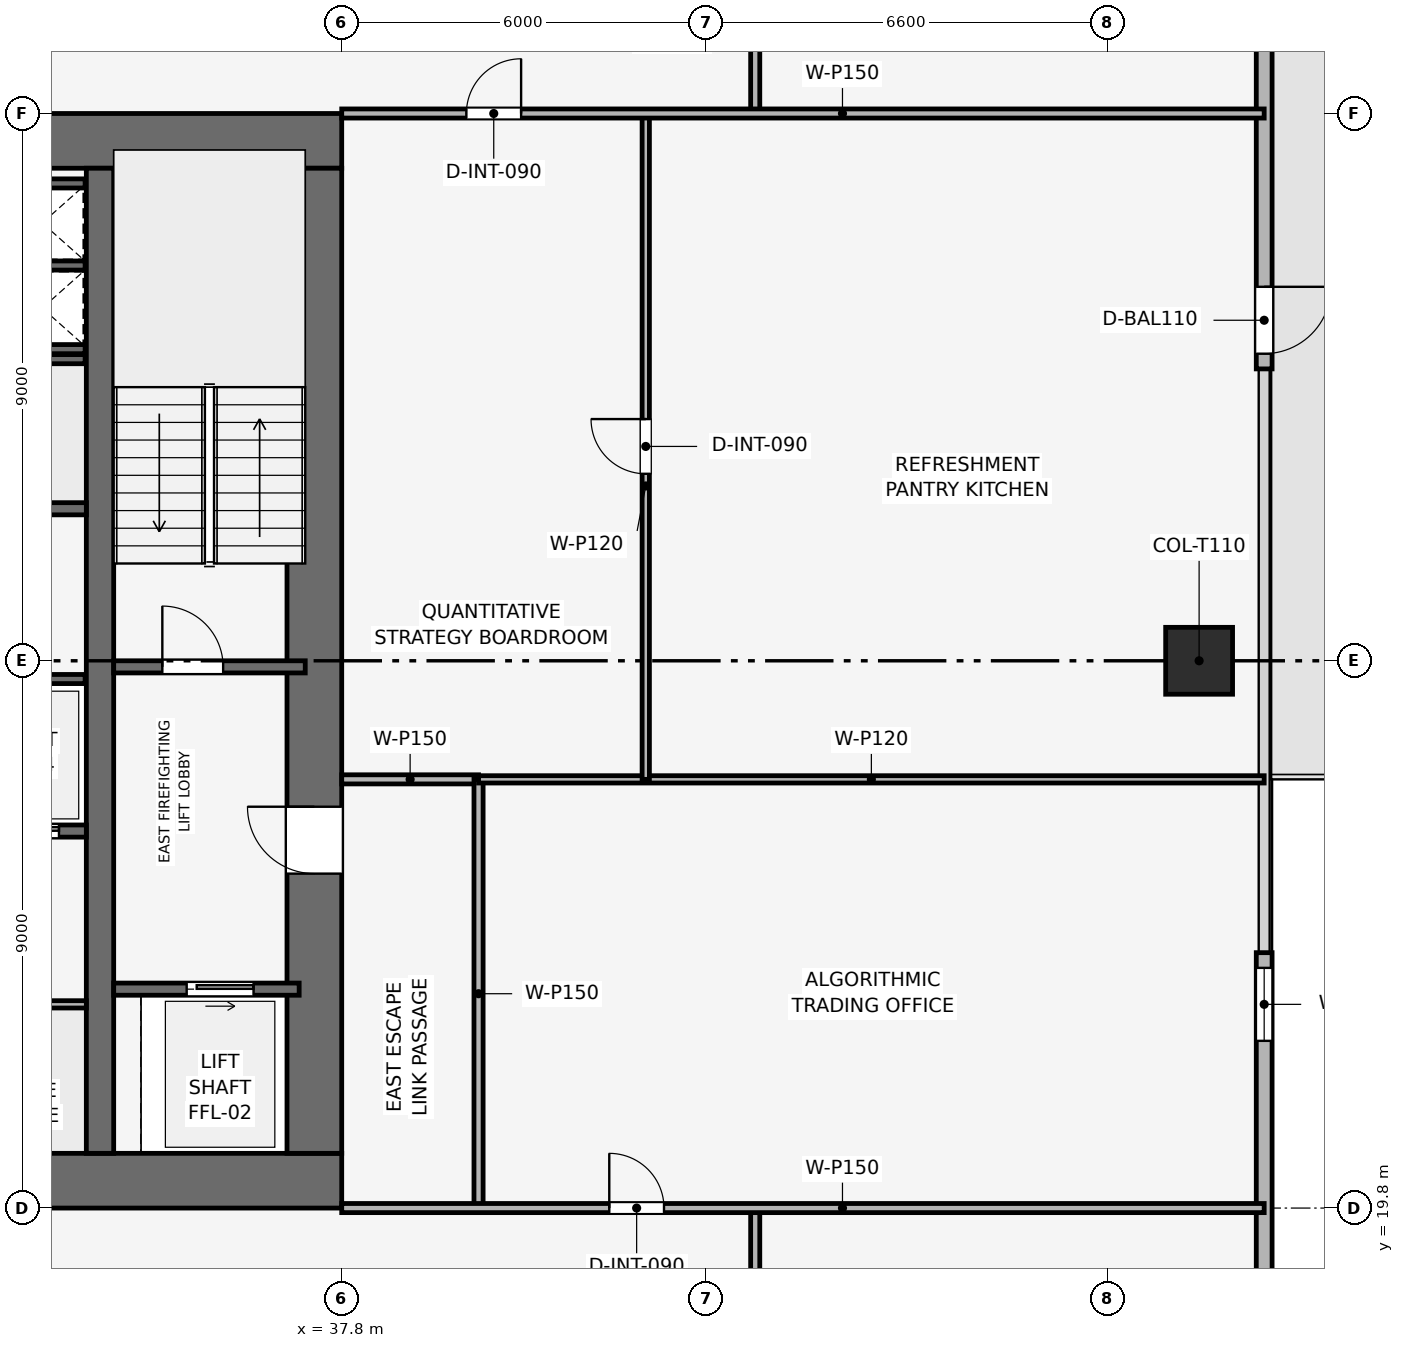
"""IFC4 building model, lengths in metres.
Left out: names, types, materials, properties, quantities, classifications, styles, units other than length and angle.
Written with IfcOpenShell. Run it as: python <this file> out.ifc"""

import sys

from ifc_helpers import new_model, si_unit, direction, frame, frame_2d, origin, origin_2d, place, context, subcontext, project, spatial, rectangle, extrude, element, fill, save


model = new_model("IFC4")
c1 = context("Model", 3, precision=1e-05, world=origin(), true_north=direction((0.0, 1.0)))
c2 = subcontext(c1, "Body", "Model", "MODEL_VIEW")
j1 = project(units=[si_unit("LENGTHUNIT", "METRE"), si_unit("PLANEANGLEUNIT", "RADIAN")], contexts=[c1])
p1 = place(None, origin())
s1 = spatial("IfcSite", under=j1, at=p1, CompositionType="ELEMENT")
p2 = place(p1, origin())
s2 = spatial("IfcBuilding", under=s1, at=p2, CompositionType="ELEMENT")
p3 = place(p2, frame((0.0, 0.0, 153.3)))
s3 = spatial("IfcBuildingStorey", under=s2, at=p3, CompositionType="ELEMENT", Elevation=153.3)
p4 = place(p3, frame((19.8, 20.25, 0.0), z_axis=(0.0, 0.0, 1.0), x_axis=(1.0, 0.0, 0.0)))
e1 = element("IfcWall", 1, at=p4, inside=s3, PredefinedType="SHEAR", context=c2, shape_type="SweptSolid", body=[
    extrude(rectangle(XDim=18.0, YDim=0.9, at=frame_2d((9.0, 0.0))), origin(), (0.0, 0.0, 1.0), 3.75),
])
p5 = place(p4, frame((8.4, 0.0, 0.0)))
e2 = element("IfcOpeningElement", 2, at=p5, cuts=e1, PredefinedType="OPENING", context=c2, shape_type="SweptSolid", body=[
    extrude(rectangle(XDim=1.2, YDim=2.2, at=frame_2d((0.6, 1.1))), frame((0.0, 0.46, 0.0), z_axis=(0.0, -1.0, 0.0), x_axis=(1.0, 0.0, 0.0)), (0.0, 0.0, 1.0), 0.92),
])
p6 = place(p3, frame((19.8, 37.35, 0.0), z_axis=(0.0, 0.0, 1.0), x_axis=(1.0, 0.0, 0.0)))
e3 = element("IfcWall", 3, at=p6, inside=s3, PredefinedType="SHEAR", context=c2, shape_type="SweptSolid", body=[
    extrude(rectangle(XDim=18.0, YDim=0.9, at=frame_2d((9.0, 0.0))), origin(), (0.0, 0.0, 1.0), 3.75),
])
p7 = place(p6, frame((7.05, 0.0, 0.0)))
e4 = element("IfcOpeningElement", 4, at=p7, cuts=e3, PredefinedType="OPENING", context=c2, shape_type="SweptSolid", body=[
    extrude(rectangle(XDim=1.1, YDim=2.15, at=frame_2d((0.55, 1.075))), frame((0.0, 0.46, 0.0), z_axis=(0.0, -1.0, 0.0), x_axis=(1.0, 0.0, 0.0)), (0.0, 0.0, 1.0), 0.92),
])
p8 = place(p3, frame((37.35, 20.7, 0.0), z_axis=(0.0, 0.0, 1.0), x_axis=(0.0, 1.0, 0.0)))
e5 = element("IfcWall", 5, at=p8, inside=s3, PredefinedType="SHEAR", context=c2, shape_type="SweptSolid", body=[
    extrude(rectangle(XDim=16.2, YDim=0.9, at=frame_2d((8.1, 0.0))), origin(), (0.0, 0.0, 1.0), 3.75),
])
p9 = place(p8, frame((4.6, 0.0, 0.0)))
e6 = element("IfcOpeningElement", 6, at=p9, cuts=e5, PredefinedType="OPENING", context=c2, shape_type="SweptSolid", body=[
    extrude(rectangle(XDim=1.1, YDim=2.15, at=frame_2d((0.55, 1.075))), frame((0.0, 0.46, 0.0), z_axis=(0.0, -1.0, 0.0), x_axis=(1.0, 0.0, 0.0)), (0.0, 0.0, 1.0), 0.92),
])
p10 = place(p3, frame((33.825, 20.7, 0.0), z_axis=(0.0, 0.0, 1.0), x_axis=(0.0, 1.0, 0.0)))
e7 = element("IfcWall", 7, at=p10, inside=s3, PredefinedType="SHEAR", context=c2, shape_type="SweptSolid", body=[
    extrude(rectangle(XDim=16.2, YDim=0.45, at=frame_2d((8.1, 0.0))), origin(), (0.0, 0.0, 1.0), 3.75),
])
p11 = place(p3, frame((51.9, 28.8, 0.003), z_axis=(0.0, 0.0, 1.0), x_axis=(1.0, 0.0, 0.0)))
e8 = element("IfcColumn", 8, at=p11, inside=s3, PredefinedType="COLUMN", context=c2, shape_type="SweptSolid", body=[
    extrude(rectangle(XDim=1.1, YDim=1.1, at=origin_2d()), origin(), (0.0, 0.0, 1.0), 3.489),
])
p12 = place(p3, frame((52.97, 46.2, 0.0), z_axis=(0.0, 0.0, 1.0), x_axis=(0.0, -1.0, 0.0)))
e9 = element("IfcWall", 9, at=p12, inside=s3, PredefinedType="SOLIDWALL", context=c2, shape_type="SweptSolid", body=[
    extrude(rectangle(XDim=12.6, YDim=0.26, at=frame_2d((6.3, 0.0))), origin(), (0.0, 0.0, 1.0), 3.495),
])
p13 = place(p12, frame((11.25, 0.0, 0.0)))
e10 = element("IfcOpeningElement", 10, at=p13, cuts=e9, PredefinedType="OPENING", context=c2, shape_type="SweptSolid", body=[
    extrude(rectangle(XDim=1.1, YDim=2.2, at=frame_2d((0.55, 1.1))), frame((0.0, 0.14, 0.0), z_axis=(0.0, -1.0, 0.0), x_axis=(1.0, 0.0, 0.0)), (0.0, 0.0, 1.0), 0.28),
])
p14 = place(p3, frame((52.97, 24.0, 0.0), z_axis=(0.0, 0.0, 1.0), x_axis=(0.0, -1.0, 0.0)))
e11 = element("IfcWall", 11, at=p14, inside=s3, PredefinedType="SOLIDWALL", context=c2, shape_type="SweptSolid", body=[
    extrude(rectangle(XDim=12.6, YDim=0.26, at=frame_2d((6.3, 0.0))), origin(), (0.0, 0.0, 1.0), 3.495),
])
p15 = place(p14, frame((0.25, 0.0, 0.9)))
e12 = element("IfcOpeningElement", 12, at=p15, cuts=e11, PredefinedType="OPENING", context=c2, shape_type="SweptSolid", body=[
    extrude(rectangle(XDim=1.2, YDim=2.1, at=frame_2d((0.6, 1.05))), frame((0.0, 0.14, 0.0), z_axis=(0.0, -1.0, 0.0), x_axis=(1.0, 0.0, 0.0)), (0.0, 0.0, 1.0), 0.28),
])
p16 = place(p3, frame((34.05, 28.7, 0.0), z_axis=(0.0, 0.0, 1.0), x_axis=(1.0, 0.0, 0.0)))
e13 = element("IfcWall", 13, at=p16, inside=s3, PredefinedType="SHEAR", context=c2, shape_type="SweptSolid", body=[
    extrude(rectangle(XDim=3.15, YDim=0.2, at=frame_2d((1.575, 0.0))), origin(), (0.0, 0.0, 1.0), 3.495),
])
p17 = place(p16, frame((0.8, 0.0, 0.0)))
e14 = element("IfcOpeningElement", 14, at=p17, cuts=e13, PredefinedType="OPENING", context=c2, shape_type="SweptSolid", body=[
    extrude(rectangle(XDim=1.0, YDim=2.1, at=frame_2d((0.5, 1.05))), frame((0.0, 0.11, 0.0), z_axis=(0.0, -1.0, 0.0), x_axis=(1.0, 0.0, 0.0)), (0.0, 0.0, 1.0), 0.22),
])
for number, where, z_axis, x_axis in (
    (15, (32.25, 33.925, 0.0), (0.0, 0.0, 1.0), (1.0, 0.0, 0.0)),
    (16, (32.25, 35.3, 0.0), (0.0, 0.0, 1.0), (1.0, 0.0, 0.0)),
):
    element("IfcWall", number, at=place(p3, frame(where, z_axis=z_axis, x_axis=x_axis)), inside=s3, PredefinedType="SHEAR", context=c2, shape_type="SweptSolid", body=[
        extrude(rectangle(XDim=1.33, YDim=0.15, at=frame_2d((0.665, 0.0))), origin(), (0.0, 0.0, 1.0), 3.495),
    ])
p18 = place(p3, frame((34.05, 23.4, 0.0), z_axis=(0.0, 0.0, 1.0), x_axis=(1.0, 0.0, 0.0)))
e17 = element("IfcWall", 17, at=p18, inside=s3, PredefinedType="SHEAR", context=c2, shape_type="SweptSolid", body=[
    extrude(rectangle(XDim=3.05, YDim=0.2, at=frame_2d((1.525, 0.0))), origin(), (0.0, 0.0, 1.0), 3.495),
])
p19 = place(p18, frame((1.2, 0.0, 0.0)))
e18 = element("IfcOpeningElement", 18, at=p19, cuts=e17, PredefinedType="OPENING", context=c2, shape_type="SweptSolid", body=[
    extrude(rectangle(XDim=1.1, YDim=2.15, at=frame_2d((0.55, 1.075))), frame((0.0, 0.11, 0.0), z_axis=(0.0, -1.0, 0.0), x_axis=(1.0, 0.0, 0.0)), (0.0, 0.0, 1.0), 0.22),
])
p20 = place(p3, frame((31.6, 26.0, 0.0), z_axis=(0.0, 0.0, 1.0), x_axis=(1.0, 0.0, 0.0)))
e19 = element("IfcWall", 19, at=p20, inside=s3, PredefinedType="SHEAR", context=c2, shape_type="SweptSolid", body=[
    extrude(rectangle(XDim=2.0, YDim=0.2, at=frame_2d((1.0, 0.0))), origin(), (0.0, 0.0, 1.0), 3.495),
])
p21 = place(p20, frame((0.45, 0.0, 0.0)))
e20 = element("IfcOpeningElement", 20, at=p21, cuts=e19, PredefinedType="OPENING", context=c2, shape_type="SweptSolid", body=[
    extrude(rectangle(XDim=1.1, YDim=2.15, at=frame_2d((0.55, 1.075))), frame((0.0, 0.11, 0.0), z_axis=(0.0, -1.0, 0.0), x_axis=(1.0, 0.0, 0.0)), (0.0, 0.0, 1.0), 0.22),
])
p22 = place(p3, frame((31.6, 31.3, 0.0), z_axis=(0.0, 0.0, 1.0), x_axis=(1.0, 0.0, 0.0)))
e21 = element("IfcWall", 21, at=p22, inside=s3, PredefinedType="SHEAR", context=c2, shape_type="SweptSolid", body=[
    extrude(rectangle(XDim=2.0, YDim=0.2, at=frame_2d((1.0, 0.0))), origin(), (0.0, 0.0, 1.0), 3.495),
])
p23 = place(p3, frame((32.25, 36.65, 0.0), z_axis=(0.0, 0.0, 1.0), x_axis=(1.0, 0.0, 0.0)))
e22 = element("IfcWall", 22, at=p23, inside=s3, PredefinedType="SHEAR", context=c2, shape_type="SweptSolid", body=[
    extrude(rectangle(XDim=1.33, YDim=0.15, at=frame_2d((0.665, 0.0))), origin(), (0.0, 0.0, 1.0), 3.495),
])
for number, where, z_axis, x_axis in (
    (23, (29.5, 28.5, 0.0), (0.0, 0.0, 1.0), (1.0, 0.0, 0.0)),
    (24, (29.5, 33.76, 0.0), (0.0, 0.0, 1.0), (1.0, 0.0, 0.0)),
):
    element("IfcWall", number, at=place(p3, frame(where, z_axis=z_axis, x_axis=x_axis)), inside=s3, PredefinedType="SHEAR", context=c2, shape_type="SweptSolid", body=[
        extrude(rectangle(XDim=4.08, YDim=0.15, at=frame_2d((2.04, 0.0))), origin(), (0.0, 0.0, 1.0), 3.495),
    ])
p24 = place(p3, frame((29.55, 23.15, 0.0), z_axis=(0.0, 0.0, 1.0), x_axis=(1.0, 0.0, 0.0)))
e25 = element("IfcWall", 25, at=p24, inside=s3, PredefinedType="PARTITIONING", context=c2, shape_type="SweptSolid", body=[
    extrude(rectangle(XDim=4.05, YDim=0.12, at=frame_2d((2.025, 0.0))), origin(), (0.0, 0.0, 1.0), 3.495),
])
p25 = place(p24, frame((1.575, 0.0, 0.0)))
e26 = element("IfcOpeningElement", 26, at=p25, cuts=e25, PredefinedType="OPENING", context=c2, shape_type="SweptSolid", body=[
    extrude(rectangle(XDim=0.9, YDim=2.1, at=frame_2d((0.45, 1.05))), frame((0.0, 0.07, 0.0), z_axis=(0.0, -1.0, 0.0), x_axis=(1.0, 0.0, 0.0)), (0.0, 0.0, 1.0), 0.14),
])
p26 = place(p3, frame((37.8, 26.85, 0.0), z_axis=(0.0, 0.0, 1.0), x_axis=(1.0, 0.0, 0.0)))
e27 = element("IfcWall", 27, at=p26, inside=s3, PredefinedType="PARTITIONING", context=c2, shape_type="SweptSolid", body=[
    extrude(rectangle(XDim=2.25, YDim=0.15, at=frame_2d((1.125, 0.0))), origin(), (0.0, 0.0, 1.0), 3.495),
])
p27 = place(p3, frame((40.05, 19.8, 0.0), z_axis=(0.0, 0.0, 1.0), x_axis=(0.0, 1.0, 0.0)))
e28 = element("IfcWall", 28, at=p27, inside=s3, PredefinedType="PARTITIONING", context=c2, shape_type="SweptSolid", body=[
    extrude(rectangle(XDim=7.05, YDim=0.15, at=frame_2d((3.525, 0.0))), origin(), (0.0, 0.0, 1.0), 3.03),
])
p28 = place(p3, frame((40.05, 26.85, 0.0), z_axis=(0.0, 0.0, 1.0), x_axis=(1.0, 0.0, 0.0)))
e29 = element("IfcWall", 29, at=p28, inside=s3, PredefinedType="PARTITIONING", context=c2, shape_type="SweptSolid", body=[
    extrude(rectangle(XDim=12.92, YDim=0.12, at=frame_2d((6.46, 0.0))), origin(), (0.0, 0.0, 1.0), 2.98),
])
p29 = place(p3, frame((42.8, 26.85, 0.0), z_axis=(0.0, 0.0, 1.0), x_axis=(0.0, 1.0, 0.0)))
e30 = element("IfcWall", 30, at=p29, inside=s3, PredefinedType="PARTITIONING", context=c2, shape_type="SweptSolid", body=[
    extrude(rectangle(XDim=10.95, YDim=0.12, at=frame_2d((5.475, 0.0))), origin(), (0.0, 0.0, 1.0), 3.03),
])
p30 = place(p29, frame((5.025, 0.0, 0.0)))
e31 = element("IfcOpeningElement", 31, at=p30, cuts=e30, PredefinedType="OPENING", context=c2, shape_type="SweptSolid", body=[
    extrude(rectangle(XDim=0.9, YDim=2.1, at=frame_2d((0.45, 1.05))), frame((0.0, 0.07, 0.0), z_axis=(0.0, -1.0, 0.0), x_axis=(1.0, 0.0, 0.0)), (0.0, 0.0, 1.0), 0.14),
])
p31 = place(p3, frame((44.6, 17.4, 0.0), z_axis=(0.0, 0.0, 1.0), x_axis=(0.0, 1.0, 0.0)))
e32 = element("IfcWall", 32, at=p31, inside=s3, PredefinedType="PARTITIONING", context=c2, shape_type="SweptSolid", body=[
    extrude(rectangle(XDim=2.4, YDim=0.15, at=frame_2d((1.2, 0.0))), origin(), (0.0, 0.0, 1.0), 3.495),
])
p32 = place(p3, frame((44.6, 37.8, 0.0), z_axis=(0.0, 0.0, 1.0), x_axis=(0.0, 1.0, 0.0)))
e33 = element("IfcWall", 33, at=p32, inside=s3, PredefinedType="PARTITIONING", context=c2, shape_type="SweptSolid", body=[
    extrude(rectangle(XDim=2.4, YDim=0.15, at=frame_2d((1.2, 0.0))), origin(), (0.0, 0.0, 1.0), 3.495),
])
p33 = place(p3, frame((37.8, 19.8, 0.0), z_axis=(0.0, 0.0, 1.0), x_axis=(1.0, 0.0, 0.0)))
e34 = element("IfcWall", 34, at=p33, inside=s3, PredefinedType="PARTITIONING", context=c2, shape_type="SweptSolid", body=[
    extrude(rectangle(XDim=15.17, YDim=0.15, at=frame_2d((7.585, 0.0))), origin(), (0.0, 0.0, 1.0), 2.98),
])
p34 = place(p33, frame((4.4, 0.0, 0.0)))
e35 = element("IfcOpeningElement", 35, at=p34, cuts=e34, PredefinedType="OPENING", context=c2, shape_type="SweptSolid", body=[
    extrude(rectangle(XDim=0.9, YDim=2.1, at=frame_2d((0.45, 1.05))), frame((0.0, 0.085, 0.0), z_axis=(0.0, -1.0, 0.0), x_axis=(1.0, 0.0, 0.0)), (0.0, 0.0, 1.0), 0.17),
])
p35 = place(p3, frame((37.8, 37.8, 0.0), z_axis=(0.0, 0.0, 1.0), x_axis=(1.0, 0.0, 0.0)))
e36 = element("IfcWall", 36, at=p35, inside=s3, PredefinedType="PARTITIONING", context=c2, shape_type="SweptSolid", body=[
    extrude(rectangle(XDim=15.17, YDim=0.15, at=frame_2d((7.585, 0.0))), origin(), (0.0, 0.0, 1.0), 2.98),
])
p36 = place(p35, frame((2.05, 0.0, 0.0)))
e37 = element("IfcOpeningElement", 37, at=p36, cuts=e36, PredefinedType="OPENING", context=c2, shape_type="SweptSolid", body=[
    extrude(rectangle(XDim=0.9, YDim=2.1, at=frame_2d((0.45, 1.05))), frame((0.0, 0.085, 0.0), z_axis=(0.0, -1.0, 0.0), x_axis=(1.0, 0.0, 0.0)), (0.0, 0.0, 1.0), 0.17),
])
p37 = place(p13, origin())
e38 = element("IfcDoor", 38, at=p37, inside=s3, OperationType="SINGLE_SWING_LEFT", PredefinedType="DOOR", context=c2, shape_type="SweptSolid", body=[
    extrude(rectangle(XDim=1.1, YDim=2.2, at=frame_2d((0.55, 1.1))), frame((0.0, 0.025, 0.0), z_axis=(0.0, -1.0, 0.0), x_axis=(1.0, 0.0, 0.0)), (0.0, 0.0, 1.0), 0.05),
])
fill(e10, e38)
p38 = place(p15, origin())
e39 = element("IfcWindow", 39, at=p38, inside=s3, PartitioningType="SINGLE_PANEL", PredefinedType="WINDOW", context=c2, shape_type="SweptSolid", body=[
    extrude(rectangle(XDim=1.2, YDim=2.1, at=frame_2d((0.6, 1.05))), frame((0.0, 0.03, 0.0), z_axis=(0.0, -1.0, 0.0), x_axis=(1.0, 0.0, 0.0)), (0.0, 0.0, 1.0), 0.06),
])
fill(e12, e39)
p39 = place(p17, origin())
e40 = element("IfcDoor", 40, at=p39, inside=s3, OperationType="SINGLE_SWING_LEFT", PredefinedType="DOOR", context=c2, shape_type="SweptSolid", body=[
    extrude(rectangle(XDim=1.0, YDim=2.1, at=frame_2d((0.5, 1.05))), frame((0.0, 0.025, 0.0), z_axis=(0.0, -1.0, 0.0), x_axis=(1.0, 0.0, 0.0)), (0.0, 0.0, 1.0), 0.05),
])
fill(e14, e40)
p40 = place(p19, origin())
e41 = element("IfcDoor", 41, at=p40, inside=s3, OperationType="SLIDING_TO_RIGHT", PredefinedType="DOOR", context=c2, shape_type="SweptSolid", body=[
    extrude(rectangle(XDim=1.1, YDim=2.15, at=frame_2d((0.55, 1.075))), frame((0.0, 0.025, 0.0), z_axis=(0.0, -1.0, 0.0), x_axis=(1.0, 0.0, 0.0)), (0.0, 0.0, 1.0), 0.05),
])
fill(e18, e41)
p41 = place(p21, origin())
e42 = element("IfcDoor", 42, at=p41, inside=s3, OperationType="SLIDING_TO_RIGHT", PredefinedType="DOOR", context=c2, shape_type="SweptSolid", body=[
    extrude(rectangle(XDim=1.1, YDim=2.15, at=frame_2d((0.55, 1.075))), frame((0.0, 0.025, 0.0), z_axis=(0.0, -1.0, 0.0), x_axis=(1.0, 0.0, 0.0)), (0.0, 0.0, 1.0), 0.05),
])
fill(e20, e42)
p42 = place(p30, origin())
e43 = element("IfcDoor", 43, at=p42, inside=s3, OperationType="SINGLE_SWING_RIGHT", PredefinedType="DOOR", context=c2, shape_type="SweptSolid", body=[
    extrude(rectangle(XDim=0.9, YDim=2.1, at=frame_2d((0.45, 1.05))), frame((0.0, 0.025, 0.0), z_axis=(0.0, -1.0, 0.0), x_axis=(1.0, 0.0, 0.0)), (0.0, 0.0, 1.0), 0.05),
])
fill(e31, e43)
p43 = place(p34, origin())
e44 = element("IfcDoor", 44, at=p43, inside=s3, OperationType="SINGLE_SWING_LEFT", PredefinedType="DOOR", context=c2, shape_type="SweptSolid", body=[
    extrude(rectangle(XDim=0.9, YDim=2.1, at=frame_2d((0.45, 1.05))), frame((0.0, 0.025, 0.0), z_axis=(0.0, -1.0, 0.0), x_axis=(1.0, 0.0, 0.0)), (0.0, 0.0, 1.0), 0.05),
])
fill(e35, e44)
p44 = place(p36, origin())
e45 = element("IfcDoor", 45, at=p44, inside=s3, OperationType="SINGLE_SWING_RIGHT", PredefinedType="DOOR", context=c2, shape_type="SweptSolid", body=[
    extrude(rectangle(XDim=0.9, YDim=2.1, at=frame_2d((0.45, 1.05))), frame((0.0, 0.025, 0.0), z_axis=(0.0, -1.0, 0.0), x_axis=(1.0, 0.0, 0.0)), (0.0, 0.0, 1.0), 0.05),
])
fill(e37, e45)
p45 = place(p9, origin())
e46 = element("IfcDoor", 46, at=p45, inside=s3, OperationType="SINGLE_SWING_RIGHT", PredefinedType="DOOR", context=c2, shape_type="SweptSolid", body=[
    extrude(rectangle(XDim=1.1, YDim=2.15, at=frame_2d((0.55, 1.075))), frame((0.0, 0.025, 0.0), z_axis=(0.0, -1.0, 0.0), x_axis=(1.0, 0.0, 0.0)), (0.0, 0.0, 1.0), 0.05),
])
fill(e6, e46)
save(model, sys.argv[1])
